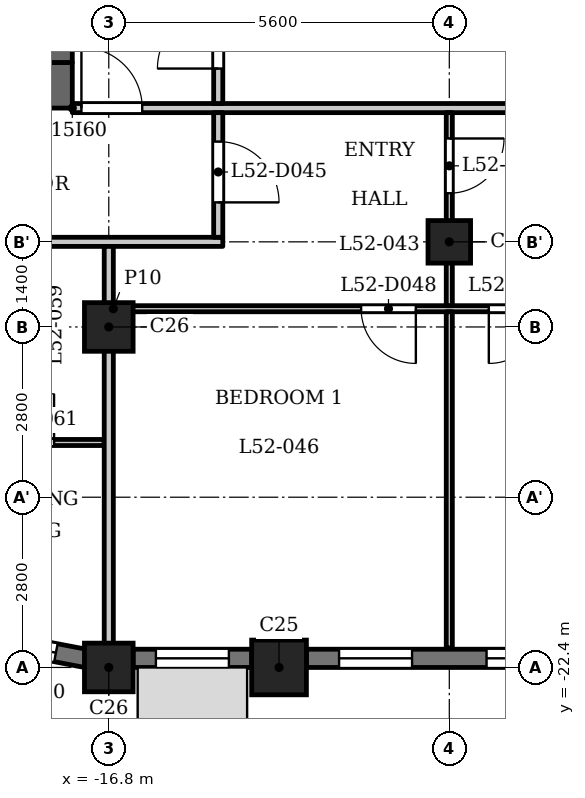
"""IFC4 building model, lengths in metres.
Left out: names, types, materials, properties, quantities, classifications, styles, units other than length and angle.
Written with IfcOpenShell. Run it as: python <this file> out.ifc"""

import sys

from ifc_helpers import new_model, si_unit, direction, frame, frame_2d, origin, origin_2d, place, context, subcontext, project, spatial, rectangle, extrude, element, fill, save


model = new_model("IFC4")
c1 = context("Model", 3, precision=1e-05, world=origin(), true_north=direction((0.0, 1.0)))
c2 = subcontext(c1, "Body", "Model", "MODEL_VIEW")
j1 = project(units=[si_unit("LENGTHUNIT", "METRE"), si_unit("PLANEANGLEUNIT", "RADIAN")], contexts=[c1])
p1 = place(None, origin())
s1 = spatial("IfcSite", under=j1, at=p1, CompositionType="ELEMENT")
p2 = place(p1, origin())
s2 = spatial("IfcBuilding", under=s1, at=p2, CompositionType="ELEMENT")
p3 = place(p2, frame((0.0, 0.0, 202.9)))
s3 = spatial("IfcBuildingStorey", under=s2, at=p3, CompositionType="ELEMENT", Elevation=202.9)
p4 = place(p3, frame((-14.0, -22.4, 0.0), z_axis=(0.0, 0.0, 1.0), x_axis=(1.0, 0.0, 0.0)))
e1 = element("IfcColumn", 1, at=p4, inside=s3, PredefinedType="COLUMN", context=c2, shape_type="SweptSolid", body=[
    extrude(rectangle(XDim=0.9, YDim=0.9, at=origin_2d()), origin(), (0.0, 0.0, 1.0), 3.5),
])
for number, where, z_axis, x_axis in (
    (2, (-16.8, -22.4, 0.0), (0.0, 0.0, 1.0), (1.0, 0.0, 0.0)),
    (3, (-16.8, -16.8, 0.0), (0.0, 0.0, 1.0), (1.0, 0.0, 0.0)),
):
    element("IfcColumn", number, at=place(p3, frame(where, z_axis=z_axis, x_axis=x_axis)), inside=s3, PredefinedType="COLUMN", context=c2, shape_type="SweptSolid", body=[
        extrude(rectangle(XDim=0.8, YDim=0.8, at=origin_2d()), origin(), (0.0, 0.0, 1.0), 3.5),
    ])
p5 = place(p3, frame((-11.2, -15.4, 0.0), z_axis=(0.0, 0.0, 1.0), x_axis=(1.0, 0.0, 0.0)))
e4 = element("IfcColumn", 4, at=p5, inside=s3, PredefinedType="COLUMN", context=c2, shape_type="SweptSolid", body=[
    extrude(rectangle(XDim=0.7, YDim=0.7, at=origin_2d()), origin(), (0.0, 0.0, 1.0), 3.5),
])
p6 = place(p3, frame((-18.946, -21.914, 0.0), z_axis=(0.0, 0.0, 1.0), x_axis=(0.98230529033, -0.187286722942, 0.0)))
e5 = element("IfcWall", 5, at=p6, inside=s3, PredefinedType="SOLIDWALL", context=c2, shape_type="SweptSolid", body=[
    extrude(rectangle(XDim=1.799, YDim=0.3, at=frame_2d((0.899, 0.0))), origin(), (0.0, 0.0, 1.0), 2.5),
])
p7 = place(p6, frame((0.5, 0.0, 0.6)))
e6 = element("IfcOpeningElement", 6, at=p7, cuts=e5, PredefinedType="OPENING", context=c2, shape_type="SweptSolid", body=[
    extrude(rectangle(XDim=0.8, YDim=1.55, at=frame_2d((0.4, 0.775))), frame((0.0, 0.16, 0.0), z_axis=(0.0, -1.0, 0.0), x_axis=(1.0, 0.0, 0.0)), (0.0, 0.0, 1.0), 0.32),
])
p8 = place(p3, frame((-16.4, -22.25, 0.0), z_axis=(0.0, 0.0, 1.0), x_axis=(1.0, 0.0, 0.0)))
e7 = element("IfcWall", 7, at=p8, inside=s3, PredefinedType="SOLIDWALL", context=c2, shape_type="SweptSolid", body=[
    extrude(rectangle(XDim=1.95, YDim=0.3, at=frame_2d((0.975, 0.0))), origin(), (0.0, 0.0, 1.0), 2.5),
])
p9 = place(p8, frame((0.375, 0.0, 0.6)))
e8 = element("IfcOpeningElement", 8, at=p9, cuts=e7, PredefinedType="OPENING", context=c2, shape_type="SweptSolid", body=[
    extrude(rectangle(XDim=1.2, YDim=1.55, at=frame_2d((0.6, 0.775))), frame((0.0, 0.16, 0.0), z_axis=(0.0, -1.0, 0.0), x_axis=(1.0, 0.0, 0.0)), (0.0, 0.0, 1.0), 0.32),
])
p10 = place(p3, frame((-13.55, -22.25, 0.0), z_axis=(0.0, 0.0, 1.0), x_axis=(1.0, 0.0, 0.0)))
e9 = element("IfcWall", 9, at=p10, inside=s3, PredefinedType="SOLIDWALL", context=c2, shape_type="SweptSolid", body=[
    extrude(rectangle(XDim=4.7, YDim=0.3, at=frame_2d((2.35, 0.0))), origin(), (0.0, 0.0, 1.0), 2.5),
])
p11 = place(p10, frame((0.538, 0.0, 0.6)))
e10 = element("IfcOpeningElement", 10, at=p11, cuts=e9, PredefinedType="OPENING", context=c2, shape_type="SweptSolid", body=[
    extrude(rectangle(XDim=1.2, YDim=1.55, at=frame_2d((0.6, 0.775))), frame((0.0, 0.16, 0.0), z_axis=(0.0, -1.0, 0.0), x_axis=(1.0, 0.0, 0.0)), (0.0, 0.0, 1.0), 0.32),
])
p12 = place(p10, frame((2.962, 0.0, 0.6)))
e11 = element("IfcOpeningElement", 11, at=p12, cuts=e9, PredefinedType="OPENING", context=c2, shape_type="SweptSolid", body=[
    extrude(rectangle(XDim=1.2, YDim=1.55, at=frame_2d((0.6, 0.775))), frame((0.0, 0.16, 0.0), z_axis=(0.0, -1.0, 0.0), x_axis=(1.0, 0.0, 0.0)), (0.0, 0.0, 1.0), 0.32),
])
p13 = place(p3, frame((-17.4, -12.825, 0.0), z_axis=(0.0, 0.0, 1.0), x_axis=(-1.0, 0.0, 0.0)))
e12 = element("IfcWall", 12, at=p13, inside=s3, PredefinedType="SHEAR", context=c2, shape_type="SweptSolid", body=[
    extrude(rectangle(XDim=7.6, YDim=0.75, at=frame_2d((3.8, 0.0))), origin(), (0.0, 0.0, 1.0), 3.2),
])
p14 = place(p3, frame((-17.6, -12.45, 0.0), z_axis=(0.0, 0.0, 1.0), x_axis=(0.0, 1.0, 0.0)))
e13 = element("IfcWall", 13, at=p14, inside=s3, PredefinedType="SHEAR", context=c2, shape_type="SweptSolid", body=[
    extrude(rectangle(XDim=24.9, YDim=0.4, at=frame_2d((12.45, 0.0))), origin(), (0.0, 0.0, 1.0), 3.2),
])
p15 = place(p14, frame((8.65, 0.0, 0.0)))
e14 = element("IfcOpeningElement", 14, at=p15, cuts=e13, PredefinedType="OPENING", context=c2, shape_type="SweptSolid", body=[
    extrude(rectangle(XDim=0.9, YDim=2.1, at=frame_2d((0.45, 1.05))), frame((0.0, 0.21, 0.0), z_axis=(0.0, -1.0, 0.0), x_axis=(1.0, 0.0, 0.0)), (0.0, 0.0, 1.0), 0.42),
])
p16 = place(p14, frame((15.6, 0.0, 0.0)))
e15 = element("IfcOpeningElement", 15, at=p16, cuts=e13, PredefinedType="OPENING", context=c2, shape_type="SweptSolid", body=[
    extrude(rectangle(XDim=1.1, YDim=2.1, at=frame_2d((0.55, 1.05))), frame((0.0, 0.21, 0.0), z_axis=(0.0, -1.0, 0.0), x_axis=(1.0, 0.0, 0.0)), (0.0, 0.0, 1.0), 0.42),
])
p17 = place(p14, frame((18.0, 0.0, 0.0)))
e16 = element("IfcOpeningElement", 16, at=p17, cuts=e13, PredefinedType="OPENING", context=c2, shape_type="SweptSolid", body=[
    extrude(rectangle(XDim=1.1, YDim=2.1, at=frame_2d((0.55, 1.05))), frame((0.0, 0.21, 0.0), z_axis=(0.0, -1.0, 0.0), x_axis=(1.0, 0.0, 0.0)), (0.0, 0.0, 1.0), 0.42),
])
p18 = place(p14, frame((23.025, 0.0, 0.0)))
e17 = element("IfcOpeningElement", 17, at=p18, cuts=e13, PredefinedType="OPENING", context=c2, shape_type="SweptSolid", body=[
    extrude(rectangle(XDim=1.1, YDim=2.1, at=frame_2d((0.55, 1.05))), frame((0.0, 0.21, 0.0), z_axis=(0.0, -1.0, 0.0), x_axis=(1.0, 0.0, 0.0)), (0.0, 0.0, 1.0), 0.42),
])
p19 = place(p14, frame((0.775, 0.0, 0.0)))
e18 = element("IfcOpeningElement", 18, at=p19, cuts=e13, PredefinedType="OPENING", context=c2, shape_type="SweptSolid", body=[
    extrude(rectangle(XDim=1.1, YDim=2.1, at=frame_2d((0.55, 1.05))), frame((0.0, 0.21, 0.0), z_axis=(0.0, -1.0, 0.0), x_axis=(1.0, 0.0, 0.0)), (0.0, 0.0, 1.0), 0.42),
])
p20 = place(p14, frame((12.925, 0.0, 0.0)))
e19 = element("IfcOpeningElement", 19, at=p20, cuts=e13, PredefinedType="OPENING", context=c2, shape_type="SweptSolid", body=[
    extrude(rectangle(XDim=1.8, YDim=2.1, at=frame_2d((0.9, 1.05))), frame((0.0, 0.21, 0.0), z_axis=(0.0, -1.0, 0.0), x_axis=(1.0, 0.0, 0.0)), (0.0, 0.0, 1.0), 0.42),
])
p21 = place(p3, frame((-22.856, -18.7, 0.0), z_axis=(0.0, 0.0, 1.0), x_axis=(1.0, 0.0, 0.0)))
e20 = element("IfcWall", 20, at=p21, inside=s3, PredefinedType="PARTITIONING", context=c2, shape_type="SweptSolid", body=[
    extrude(rectangle(XDim=5.981, YDim=0.1, at=frame_2d((2.99, 0.0))), origin(), (0.0, 0.0, 1.0), 3.2),
])
p22 = place(p21, frame((4.356, 0.0, 0.0)))
e21 = element("IfcOpeningElement", 21, at=p22, cuts=e20, PredefinedType="OPENING", context=c2, shape_type="SweptSolid", body=[
    extrude(rectangle(XDim=0.8, YDim=2.1, at=frame_2d((0.4, 1.05))), frame((0.0, 0.06, 0.0), z_axis=(0.0, -1.0, 0.0), x_axis=(1.0, 0.0, 0.0)), (0.0, 0.0, 1.0), 0.12),
])
p23 = place(p21, frame((2.084, 0.0, 0.0)))
e22 = element("IfcOpeningElement", 22, at=p23, cuts=e20, PredefinedType="OPENING", context=c2, shape_type="SweptSolid", body=[
    extrude(rectangle(XDim=0.9, YDim=2.1, at=frame_2d((0.45, 1.05))), frame((0.0, 0.06, 0.0), z_axis=(0.0, -1.0, 0.0), x_axis=(1.0, 0.0, 0.0)), (0.0, 0.0, 1.0), 0.12),
])
p24 = place(p3, frame((-16.725, -16.5, 0.0), z_axis=(0.0, 0.0, 1.0), x_axis=(1.0, 0.0, 0.0)))
e23 = element("IfcWall", 23, at=p24, inside=s3, PredefinedType="PARTITIONING", context=c2, shape_type="SweptSolid", body=[
    extrude(rectangle(XDim=33.45, YDim=0.1, at=frame_2d((16.725, 0.0))), origin(), (0.0, 0.0, 1.0), 3.2),
])
p25 = place(p24, frame((4.075, 0.0, 0.0)))
e24 = element("IfcOpeningElement", 24, at=p25, cuts=e23, PredefinedType="OPENING", context=c2, shape_type="SweptSolid", body=[
    extrude(rectangle(XDim=0.9, YDim=2.1, at=frame_2d((0.45, 1.05))), frame((0.0, 0.06, 0.0), z_axis=(0.0, -1.0, 0.0), x_axis=(1.0, 0.0, 0.0)), (0.0, 0.0, 1.0), 0.12),
])
p26 = place(p24, frame((6.175, 0.0, 0.0)))
e25 = element("IfcOpeningElement", 25, at=p26, cuts=e23, PredefinedType="OPENING", context=c2, shape_type="SweptSolid", body=[
    extrude(rectangle(XDim=0.9, YDim=2.1, at=frame_2d((0.45, 1.05))), frame((0.0, 0.06, 0.0), z_axis=(0.0, -1.0, 0.0), x_axis=(1.0, 0.0, 0.0)), (0.0, 0.0, 1.0), 0.12),
])
p27 = place(p24, frame((30.575, 0.0, 0.0)))
e26 = element("IfcOpeningElement", 26, at=p27, cuts=e23, PredefinedType="OPENING", context=c2, shape_type="SweptSolid", body=[
    extrude(rectangle(XDim=0.9, YDim=2.1, at=frame_2d((0.45, 1.05))), frame((0.0, 0.06, 0.0), z_axis=(0.0, -1.0, 0.0), x_axis=(1.0, 0.0, 0.0)), (0.0, 0.0, 1.0), 0.12),
])
p28 = place(p24, frame((22.975, 0.0, 0.0)))
e27 = element("IfcOpeningElement", 27, at=p28, cuts=e23, PredefinedType="OPENING", context=c2, shape_type="SweptSolid", body=[
    extrude(rectangle(XDim=0.9, YDim=2.1, at=frame_2d((0.45, 1.05))), frame((0.0, 0.06, 0.0), z_axis=(0.0, -1.0, 0.0), x_axis=(1.0, 0.0, 0.0)), (0.0, 0.0, 1.0), 0.12),
])
p29 = place(p3, frame((-24.684, -15.4, 0.0), z_axis=(0.0, 0.0, 1.0), x_axis=(1.0, 0.0, 0.0)))
e28 = element("IfcWall", 28, at=p29, inside=s3, PredefinedType="PARTITIONING", context=c2, shape_type="SweptSolid", body=[
    extrude(rectangle(XDim=9.759, YDim=0.15, at=frame_2d((4.879, 0.0))), origin(), (0.0, 0.0, 1.0), 3.2),
])
p30 = place(p29, frame((3.643, 0.0, 0.0)))
e29 = element("IfcOpeningElement", 29, at=p30, cuts=e28, PredefinedType="OPENING", context=c2, shape_type="SweptSolid", body=[
    extrude(rectangle(XDim=1.0, YDim=2.1, at=frame_2d((0.5, 1.05))), frame((0.0, 0.085, 0.0), z_axis=(0.0, -1.0, 0.0), x_axis=(1.0, 0.0, 0.0)), (0.0, 0.0, 1.0), 0.17),
])
p31 = place(p3, frame((-17.4, -13.2, 0.0), z_axis=(0.0, 0.0, 1.0), x_axis=(1.0, 0.0, 0.0)))
e30 = element("IfcWall", 30, at=p31, inside=s3, PredefinedType="PARTITIONING", context=c2, shape_type="SweptSolid", body=[
    extrude(rectangle(XDim=34.8, YDim=0.15, at=frame_2d((17.4, 0.0))), origin(), (0.0, 0.0, 1.0), 3.2),
])
p32 = place(p31, frame((0.15, 0.0, 0.0)))
e31 = element("IfcOpeningElement", 31, at=p32, cuts=e30, PredefinedType="OPENING", context=c2, shape_type="SweptSolid", body=[
    extrude(rectangle(XDim=1.0, YDim=2.1, at=frame_2d((0.5, 1.05))), frame((0.0, 0.085, 0.0), z_axis=(0.0, -1.0, 0.0), x_axis=(1.0, 0.0, 0.0)), (0.0, 0.0, 1.0), 0.17),
])
p33 = place(p31, frame((33.55, 0.0, 0.0)))
e32 = element("IfcOpeningElement", 32, at=p33, cuts=e30, PredefinedType="OPENING", context=c2, shape_type="SweptSolid", body=[
    extrude(rectangle(XDim=1.0, YDim=2.1, at=frame_2d((0.5, 1.05))), frame((0.0, 0.085, 0.0), z_axis=(0.0, -1.0, 0.0), x_axis=(1.0, 0.0, 0.0)), (0.0, 0.0, 1.0), 0.17),
])
p34 = place(p3, frame((-16.8, -22.31, 0.0), z_axis=(0.0, 0.0, 1.0), x_axis=(0.0, 1.0, 0.0)))
e33 = element("IfcWall", 33, at=p34, inside=s3, PredefinedType="PARTITIONING", context=c2, shape_type="SweptSolid", body=[
    extrude(rectangle(XDim=6.835, YDim=0.15, at=frame_2d((3.417, 0.0))), origin(), (0.0, 0.0, 1.0), 2.55),
])
p35 = place(p3, frame((-15.0, -15.325, 0.0), z_axis=(0.0, 0.0, 1.0), x_axis=(0.0, 1.0, 0.0)))
e34 = element("IfcWall", 34, at=p35, inside=s3, PredefinedType="PARTITIONING", context=c2, shape_type="SweptSolid", body=[
    extrude(rectangle(XDim=2.05, YDim=0.15, at=frame_2d((1.025, 0.0))), origin(), (0.0, 0.0, 1.0), 3.2),
])
p36 = place(p35, frame((0.574, 0.0, 0.0)))
e35 = element("IfcOpeningElement", 35, at=p36, cuts=e34, PredefinedType="OPENING", context=c2, shape_type="SweptSolid", body=[
    extrude(rectangle(XDim=1.0, YDim=2.1, at=frame_2d((0.5, 1.05))), frame((0.0, 0.085, 0.0), z_axis=(0.0, -1.0, 0.0), x_axis=(1.0, 0.0, 0.0)), (0.0, 0.0, 1.0), 0.17),
])
p37 = place(p3, frame((-15.0, -13.125, 0.0), z_axis=(0.0, 0.0, 1.0), x_axis=(0.0, 1.0, 0.0)))
e36 = element("IfcWall", 36, at=p37, inside=s3, PredefinedType="PARTITIONING", context=c2, shape_type="SweptSolid", body=[
    extrude(rectangle(XDim=6.356, YDim=0.15, at=frame_2d((3.178, 0.0))), origin(), (0.0, 0.0, 1.0), 3.2),
])
p38 = place(p37, frame((0.575, 0.0, 0.0)))
e37 = element("IfcOpeningElement", 37, at=p38, cuts=e36, PredefinedType="OPENING", context=c2, shape_type="SweptSolid", body=[
    extrude(rectangle(XDim=1.0, YDim=2.1, at=frame_2d((0.5, 1.05))), frame((0.0, 0.085, 0.0), z_axis=(0.0, -1.0, 0.0), x_axis=(1.0, 0.0, 0.0)), (0.0, 0.0, 1.0), 0.17),
])
p39 = place(p3, frame((-11.2, -22.08, 0.0), z_axis=(0.0, 0.0, 1.0), x_axis=(0.0, 1.0, 0.0)))
e38 = element("IfcWall", 38, at=p39, inside=s3, PredefinedType="PARTITIONING", context=c2, shape_type="SweptSolid", body=[
    extrude(rectangle(XDim=5.53, YDim=0.1, at=frame_2d((2.765, 0.0))), origin(), (0.0, 0.0, 1.0), 3.2),
])
p40 = place(p3, frame((-11.2, -16.45, 0.0), z_axis=(0.0, 0.0, 1.0), x_axis=(0.0, 1.0, 0.0)))
e39 = element("IfcWall", 39, at=p40, inside=s3, PredefinedType="PARTITIONING", context=c2, shape_type="SweptSolid", body=[
    extrude(rectangle(XDim=3.175, YDim=0.1, at=frame_2d((1.587, 0.0))), origin(), (0.0, 0.0, 1.0), 3.2),
])
p41 = place(p40, frame((1.85, 0.0, 0.0)))
e40 = element("IfcOpeningElement", 40, at=p41, cuts=e39, PredefinedType="OPENING", context=c2, shape_type="SweptSolid", body=[
    extrude(rectangle(XDim=0.9, YDim=2.1, at=frame_2d((0.45, 1.05))), frame((0.0, 0.06, 0.0), z_axis=(0.0, -1.0, 0.0), x_axis=(1.0, 0.0, 0.0)), (0.0, 0.0, 1.0), 0.12),
])
p42 = place(p38, origin())
e41 = element("IfcDoor", 41, at=p42, inside=s3, OperationType="SINGLE_SWING_RIGHT", PredefinedType="DOOR", context=c2, shape_type="SweptSolid", body=[
    extrude(rectangle(XDim=1.0, YDim=2.1, at=frame_2d((0.5, 1.05))), frame((0.0, 0.025, 0.0), z_axis=(0.0, -1.0, 0.0), x_axis=(1.0, 0.0, 0.0)), (0.0, 0.0, 1.0), 0.05),
])
fill(e37, e41)
p43 = place(p32, origin())
e42 = element("IfcDoor", 42, at=p43, inside=s3, OperationType="SINGLE_SWING_RIGHT", PredefinedType="DOOR", context=c2, shape_type="SweptSolid", body=[
    extrude(rectangle(XDim=1.0, YDim=2.1, at=frame_2d((0.5, 1.05))), frame((0.0, 0.025, 0.0), z_axis=(0.0, -1.0, 0.0), x_axis=(1.0, 0.0, 0.0)), (0.0, 0.0, 1.0), 0.05),
])
fill(e31, e42)
p44 = place(p36, origin())
e43 = element("IfcDoor", 43, at=p44, inside=s3, OperationType="SINGLE_SWING_LEFT", PredefinedType="DOOR", context=c2, shape_type="SweptSolid", body=[
    extrude(rectangle(XDim=1.0, YDim=2.1, at=frame_2d((0.5, 1.05))), frame((0.0, 0.025, 0.0), z_axis=(0.0, -1.0, 0.0), x_axis=(1.0, 0.0, 0.0)), (0.0, 0.0, 1.0), 0.05),
])
fill(e35, e43)
p45 = place(p41, origin())
e44 = element("IfcDoor", 44, at=p45, inside=s3, OperationType="SINGLE_SWING_RIGHT", PredefinedType="DOOR", context=c2, shape_type="SweptSolid", body=[
    extrude(rectangle(XDim=0.9, YDim=2.1, at=frame_2d((0.45, 1.05))), frame((0.0, 0.025, 0.0), z_axis=(0.0, -1.0, 0.0), x_axis=(1.0, 0.0, 0.0)), (0.0, 0.0, 1.0), 0.05),
])
fill(e40, e44)
p46 = place(p25, origin())
e45 = element("IfcDoor", 45, at=p46, inside=s3, OperationType="SINGLE_SWING_RIGHT", PredefinedType="DOOR", context=c2, shape_type="SweptSolid", body=[
    extrude(rectangle(XDim=0.9, YDim=2.1, at=frame_2d((0.45, 1.05))), frame((0.0, 0.025, 0.0), z_axis=(0.0, -1.0, 0.0), x_axis=(1.0, 0.0, 0.0)), (0.0, 0.0, 1.0), 0.05),
])
fill(e24, e45)
p47 = place(p26, origin())
e46 = element("IfcDoor", 46, at=p47, inside=s3, OperationType="SINGLE_SWING_LEFT", PredefinedType="DOOR", context=c2, shape_type="SweptSolid", body=[
    extrude(rectangle(XDim=0.9, YDim=2.1, at=frame_2d((0.45, 1.05))), frame((0.0, 0.025, 0.0), z_axis=(0.0, -1.0, 0.0), x_axis=(1.0, 0.0, 0.0)), (0.0, 0.0, 1.0), 0.05),
])
fill(e25, e46)
p48 = place(p22, origin())
e47 = element("IfcDoor", 47, at=p48, inside=s3, OperationType="SINGLE_SWING_LEFT", PredefinedType="DOOR", context=c2, shape_type="SweptSolid", body=[
    extrude(rectangle(XDim=0.8, YDim=2.1, at=frame_2d((0.4, 1.05))), frame((0.0, 0.025, 0.0), z_axis=(0.0, -1.0, 0.0), x_axis=(1.0, 0.0, 0.0)), (0.0, 0.0, 1.0), 0.05),
])
fill(e21, e47)
p49 = place(p7, origin())
e48 = element("IfcWindow", 48, at=p49, inside=s3, PartitioningType="SINGLE_PANEL", PredefinedType="WINDOW", context=c2, shape_type="SweptSolid", body=[
    extrude(rectangle(XDim=0.8, YDim=1.55, at=frame_2d((0.4, 0.775))), frame((0.0, 0.03, 0.0), z_axis=(0.0, -1.0, 0.0), x_axis=(1.0, 0.0, 0.0)), (0.0, 0.0, 1.0), 0.06),
])
fill(e6, e48)
p50 = place(p9, origin())
e49 = element("IfcWindow", 49, at=p50, inside=s3, PartitioningType="SINGLE_PANEL", PredefinedType="WINDOW", context=c2, shape_type="SweptSolid", body=[
    extrude(rectangle(XDim=1.2, YDim=1.55, at=frame_2d((0.6, 0.775))), frame((0.0, 0.03, 0.0), z_axis=(0.0, -1.0, 0.0), x_axis=(1.0, 0.0, 0.0)), (0.0, 0.0, 1.0), 0.06),
])
fill(e8, e49)
p51 = place(p11, origin())
e50 = element("IfcWindow", 50, at=p51, inside=s3, PartitioningType="SINGLE_PANEL", PredefinedType="WINDOW", context=c2, shape_type="SweptSolid", body=[
    extrude(rectangle(XDim=1.2, YDim=1.55, at=frame_2d((0.6, 0.775))), frame((0.0, 0.03, 0.0), z_axis=(0.0, -1.0, 0.0), x_axis=(1.0, 0.0, 0.0)), (0.0, 0.0, 1.0), 0.06),
])
fill(e10, e50)
p52 = place(p12, origin())
e51 = element("IfcWindow", 51, at=p52, inside=s3, PartitioningType="SINGLE_PANEL", PredefinedType="WINDOW", context=c2, shape_type="SweptSolid", body=[
    extrude(rectangle(XDim=1.2, YDim=1.55, at=frame_2d((0.6, 0.775))), frame((0.0, 0.03, 0.0), z_axis=(0.0, -1.0, 0.0), x_axis=(1.0, 0.0, 0.0)), (0.0, 0.0, 1.0), 0.06),
])
fill(e11, e51)
save(model, sys.argv[1])
